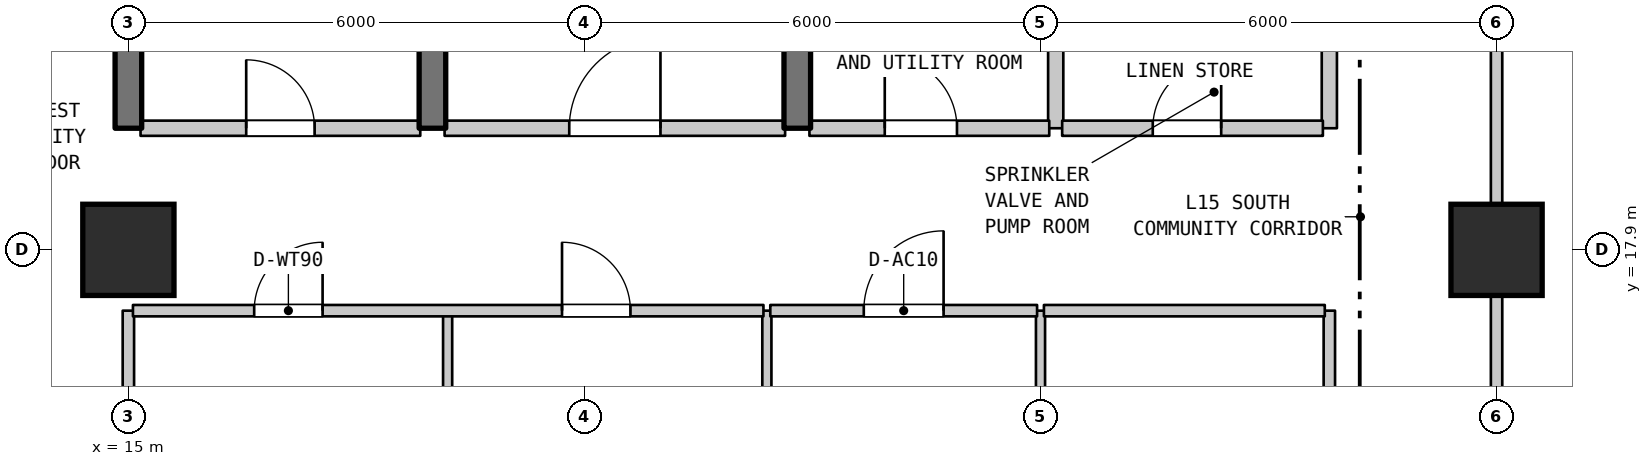
"""IFC4 building model, lengths in metres.
Left out: names, types, materials, properties, quantities, classifications, styles, units other than length and angle.
Written with IfcOpenShell. Run it as: python <this file> out.ifc"""

import sys

from ifc_helpers import new_model, si_unit, direction, frame, frame_2d, origin, origin_2d, place, context, subcontext, project, spatial, rectangle, extrude, element, fill, save


model = new_model("IFC4")
c1 = context("Model", 3, precision=1e-05, world=origin(), true_north=direction((0.0, 1.0)))
c2 = subcontext(c1, "Body", "Model", "MODEL_VIEW")
j1 = project(units=[si_unit("LENGTHUNIT", "METRE"), si_unit("PLANEANGLEUNIT", "RADIAN")], contexts=[c1])
p1 = place(None, origin())
s1 = spatial("IfcSite", under=j1, at=p1, CompositionType="ELEMENT")
p2 = place(p1, origin())
s2 = spatial("IfcBuilding", under=s1, at=p2, CompositionType="ELEMENT")
p3 = place(p2, frame((0.0, 0.0, 65.6)))
s3 = spatial("IfcBuildingStorey", under=s2, at=p3, CompositionType="ELEMENT", Elevation=65.6)
for number, where, z_axis, x_axis in (
    (1, (15.0, 17.9, 0.0), (0.0, 0.0, 1.0), (1.0, 0.0, 0.0)),
    (2, (33.0, 17.9, 0.0), (0.0, 0.0, 1.0), (1.0, 0.0, 0.0)),
):
    element("IfcColumn", number, at=place(p3, frame(where, z_axis=z_axis, x_axis=x_axis)), inside=s3, PredefinedType="COLUMN", context=c2, shape_type="SweptSolid", body=[
        extrude(rectangle(XDim=1.2, YDim=1.2, at=origin_2d()), origin(), (0.0, 0.0, 1.0), 4.5),
    ])
p4 = place(p3, frame((15.0, 13.0, 0.0), z_axis=(0.0, 0.0, 1.0), x_axis=(0.0, 1.0, 0.0)))
e3 = element("IfcWall", 3, at=p4, inside=s3, PredefinedType="STANDARD", context=c2, shape_type="SweptSolid", body=[
    extrude(rectangle(XDim=4.1, YDim=0.15, at=frame_2d((2.05, 0.0))), origin(), (0.0, 0.0, 1.0), 3.685),
])
for number, where, z_axis, x_axis in (
    (4, (15.0, 19.5, 0.0), (0.0, 0.0, 1.0), (0.0, 1.0, 0.0)),
    (5, (19.0, 19.5, 0.0), (0.0, 0.0, 1.0), (0.0, 1.0, 0.0)),
):
    element("IfcWall", number, at=place(p3, frame(where, z_axis=z_axis, x_axis=x_axis)), inside=s3, PredefinedType="SHEAR", context=c2, shape_type="SweptSolid", body=[
        extrude(rectangle(XDim=3.2, YDim=0.35, at=frame_2d((1.6, 0.0))), origin(), (0.0, 0.0, 1.0), 4.185),
    ])
for number, where, z_axis, x_axis in (
    (6, (19.2, 13.0, 0.0), (0.0, 0.0, 1.0), (0.0, 1.0, 0.0)),
    (7, (23.4, 13.0, 0.0), (0.0, 0.0, 1.0), (0.0, 1.0, 0.0)),
):
    element("IfcWall", number, at=place(p3, frame(where, z_axis=z_axis, x_axis=x_axis)), inside=s3, PredefinedType="PARTITIONING", context=c2, shape_type="SweptSolid", body=[
        extrude(rectangle(XDim=4.1, YDim=0.12, at=frame_2d((2.05, 0.0))), origin(), (0.0, 0.0, 1.0), 4.185),
    ])
p5 = place(p3, frame((23.8, 19.5, 0.0), z_axis=(0.0, 0.0, 1.0), x_axis=(0.0, 1.0, 0.0)))
e8 = element("IfcWall", 8, at=p5, inside=s3, PredefinedType="SHEAR", context=c2, shape_type="SweptSolid", body=[
    extrude(rectangle(XDim=3.2, YDim=0.35, at=frame_2d((1.6, 0.0))), origin(), (0.0, 0.0, 1.0), 4.185),
])
p6 = place(p3, frame((27.0, 14.5, 0.0), z_axis=(0.0, 0.0, 1.0), x_axis=(0.0, 1.0, 0.0)))
e9 = element("IfcWall", 9, at=p6, inside=s3, PredefinedType="PARTITIONING", context=c2, shape_type="SweptSolid", body=[
    extrude(rectangle(XDim=2.6, YDim=0.12, at=frame_2d((1.3, 0.0))), origin(), (0.0, 0.0, 1.0), 4.185),
])
p7 = place(p3, frame((27.2, 19.5, 0.0), z_axis=(0.0, 0.0, 1.0), x_axis=(0.0, 1.0, 0.0)))
e10 = element("IfcWall", 10, at=p7, inside=s3, PredefinedType="STANDARD", context=c2, shape_type="SweptSolid", body=[
    extrude(rectangle(XDim=1.6, YDim=0.2, at=frame_2d((0.8, 0.0))), origin(), (0.0, 0.0, 1.0), 4.185),
])
p8 = place(p3, frame((30.8, 14.5, 0.0), z_axis=(0.0, 0.0, 1.0), x_axis=(0.0, 1.0, 0.0)))
e11 = element("IfcWall", 11, at=p8, inside=s3, PredefinedType="STANDARD", context=c2, shape_type="SweptSolid", body=[
    extrude(rectangle(XDim=2.6, YDim=0.15, at=frame_2d((1.3, 0.0))), origin(), (0.0, 0.0, 1.0), 4.185),
])
p9 = place(p3, frame((30.8, 19.5, 0.0), z_axis=(0.0, 0.0, 1.0), x_axis=(0.0, 1.0, 0.0)))
e12 = element("IfcWall", 12, at=p9, inside=s3, PredefinedType="STANDARD", context=c2, shape_type="SweptSolid", body=[
    extrude(rectangle(XDim=1.6, YDim=0.2, at=frame_2d((0.8, 0.0))), origin(), (0.0, 0.0, 1.0), 4.185),
])
p10 = place(p3, frame((33.0, 6.7, 0.0), z_axis=(0.0, 0.0, 1.0), x_axis=(0.0, 1.0, 0.0)))
e13 = element("IfcWall", 13, at=p10, inside=s3, PredefinedType="STANDARD", context=c2, shape_type="SweptSolid", body=[
    extrude(rectangle(XDim=19.2, YDim=0.15, at=frame_2d((9.6, 0.0))), origin(), (0.0, 0.0, 1.0), 3.685),
])
p11 = place(p3, frame((15.06, 17.1, 0.0), z_axis=(0.0, 0.0, 1.0), x_axis=(1.0, 0.0, 0.0)))
e14 = element("IfcWall", 14, at=p11, inside=s3, PredefinedType="STANDARD", context=c2, shape_type="SweptSolid", body=[
    extrude(rectangle(XDim=8.295, YDim=0.15, at=frame_2d((4.147, 0.0))), origin(), (0.0, 0.0, 1.0), 4.185),
])
p12 = place(p11, frame((1.595, 0.0, 0.0)))
e15 = element("IfcOpeningElement", 15, at=p12, cuts=e14, PredefinedType="OPENING", context=c2, shape_type="SweptSolid", body=[
    extrude(rectangle(XDim=0.9, YDim=2.1, at=frame_2d((0.45, 1.05))), frame((0.0, 0.085, 0.0), z_axis=(0.0, -1.0, 0.0), x_axis=(1.0, 0.0, 0.0)), (0.0, 0.0, 1.0), 0.17),
])
p13 = place(p11, frame((5.645, 0.0, 0.0)))
e16 = element("IfcOpeningElement", 16, at=p13, cuts=e14, PredefinedType="OPENING", context=c2, shape_type="SweptSolid", body=[
    extrude(rectangle(XDim=0.9, YDim=2.1, at=frame_2d((0.45, 1.05))), frame((0.0, 0.085, 0.0), z_axis=(0.0, -1.0, 0.0), x_axis=(1.0, 0.0, 0.0)), (0.0, 0.0, 1.0), 0.17),
])
p14 = place(p3, frame((23.445, 17.1, 0.0), z_axis=(0.0, 0.0, 1.0), x_axis=(1.0, 0.0, 0.0)))
e17 = element("IfcWall", 17, at=p14, inside=s3, PredefinedType="STANDARD", context=c2, shape_type="SweptSolid", body=[
    extrude(rectangle(XDim=3.51, YDim=0.15, at=frame_2d((1.755, 0.0))), origin(), (0.0, 0.0, 1.0), 4.185),
])
p15 = place(p14, frame((1.23, 0.0, 0.0)))
e18 = element("IfcOpeningElement", 18, at=p15, cuts=e17, PredefinedType="OPENING", context=c2, shape_type="SweptSolid", body=[
    extrude(rectangle(XDim=1.05, YDim=2.15, at=frame_2d((0.525, 1.075))), frame((0.0, 0.085, 0.0), z_axis=(0.0, -1.0, 0.0), x_axis=(1.0, 0.0, 0.0)), (0.0, 0.0, 1.0), 0.17),
])
p16 = place(p3, frame((27.045, 17.1, 0.0), z_axis=(0.0, 0.0, 1.0), x_axis=(1.0, 0.0, 0.0)))
e19 = element("IfcWall", 19, at=p16, inside=s3, PredefinedType="STANDARD", context=c2, shape_type="SweptSolid", body=[
    extrude(rectangle(XDim=3.695, YDim=0.15, at=frame_2d((1.848, 0.0))), origin(), (0.0, 0.0, 1.0), 4.185),
])
p17 = place(p3, frame((15.16, 19.5, 0.0), z_axis=(0.0, 0.0, 1.0), x_axis=(1.0, 0.0, 0.0)))
e20 = element("IfcWall", 20, at=p17, inside=s3, PredefinedType="STANDARD", context=c2, shape_type="SweptSolid", body=[
    extrude(rectangle(XDim=3.68, YDim=0.2, at=frame_2d((1.84, 0.0))), origin(), (0.0, 0.0, 1.0), 4.185),
])
p18 = place(p17, frame((1.39, 0.0, 0.0)))
e21 = element("IfcOpeningElement", 21, at=p18, cuts=e20, PredefinedType="OPENING", context=c2, shape_type="SweptSolid", body=[
    extrude(rectangle(XDim=0.9, YDim=2.15, at=frame_2d((0.45, 1.075))), frame((0.0, 0.11, 0.0), z_axis=(0.0, -1.0, 0.0), x_axis=(1.0, 0.0, 0.0)), (0.0, 0.0, 1.0), 0.22),
])
p19 = place(p3, frame((19.16, 19.5, 0.0), z_axis=(0.0, 0.0, 1.0), x_axis=(1.0, 0.0, 0.0)))
e22 = element("IfcWall", 22, at=p19, inside=s3, PredefinedType="STANDARD", context=c2, shape_type="SweptSolid", body=[
    extrude(rectangle(XDim=4.48, YDim=0.2, at=frame_2d((2.24, 0.0))), origin(), (0.0, 0.0, 1.0), 4.185),
])
p20 = place(p19, frame((1.64, 0.0, 0.0)))
e23 = element("IfcOpeningElement", 23, at=p20, cuts=e22, PredefinedType="OPENING", context=c2, shape_type="SweptSolid", body=[
    extrude(rectangle(XDim=1.2, YDim=2.2, at=frame_2d((0.6, 1.1))), frame((0.0, 0.11, 0.0), z_axis=(0.0, -1.0, 0.0), x_axis=(1.0, 0.0, 0.0)), (0.0, 0.0, 1.0), 0.22),
])
p21 = place(p3, frame((23.96, 19.5, 0.0), z_axis=(0.0, 0.0, 1.0), x_axis=(1.0, 0.0, 0.0)))
e24 = element("IfcWall", 24, at=p21, inside=s3, PredefinedType="STANDARD", context=c2, shape_type="SweptSolid", body=[
    extrude(rectangle(XDim=3.155, YDim=0.2, at=frame_2d((1.578, 0.0))), origin(), (0.0, 0.0, 1.0), 4.185),
])
p22 = place(p21, frame((0.991, 0.0, 0.0)))
e25 = element("IfcOpeningElement", 25, at=p22, cuts=e24, PredefinedType="OPENING", context=c2, shape_type="SweptSolid", body=[
    extrude(rectangle(XDim=0.95, YDim=2.15, at=frame_2d((0.475, 1.075))), frame((0.0, 0.11, 0.0), z_axis=(0.0, -1.0, 0.0), x_axis=(1.0, 0.0, 0.0)), (0.0, 0.0, 1.0), 0.22),
])
p23 = place(p3, frame((27.285, 19.5, 0.0), z_axis=(0.0, 0.0, 1.0), x_axis=(1.0, 0.0, 0.0)))
e26 = element("IfcWall", 26, at=p23, inside=s3, PredefinedType="STANDARD", context=c2, shape_type="SweptSolid", body=[
    extrude(rectangle(XDim=3.43, YDim=0.2, at=frame_2d((1.715, 0.0))), origin(), (0.0, 0.0, 1.0), 4.185),
])
p24 = place(p23, frame((1.192, 0.0, 0.0)))
e27 = element("IfcOpeningElement", 27, at=p24, cuts=e26, PredefinedType="OPENING", context=c2, shape_type="SweptSolid", body=[
    extrude(rectangle(XDim=0.9, YDim=2.15, at=frame_2d((0.45, 1.075))), frame((0.0, 0.11, 0.0), z_axis=(0.0, -1.0, 0.0), x_axis=(1.0, 0.0, 0.0)), (0.0, 0.0, 1.0), 0.22),
])
p25 = place(p12, origin())
e28 = element("IfcDoor", 28, at=p25, inside=s3, OperationType="SINGLE_SWING_RIGHT", PredefinedType="DOOR", context=c2, shape_type="SweptSolid", body=[
    extrude(rectangle(XDim=0.9, YDim=2.1, at=frame_2d((0.45, 1.05))), frame((0.0, 0.025, 0.0), z_axis=(0.0, -1.0, 0.0), x_axis=(1.0, 0.0, 0.0)), (0.0, 0.0, 1.0), 0.05),
])
fill(e15, e28)
p26 = place(p13, origin())
e29 = element("IfcDoor", 29, at=p26, inside=s3, OperationType="SINGLE_SWING_LEFT", PredefinedType="DOOR", context=c2, shape_type="SweptSolid", body=[
    extrude(rectangle(XDim=0.9, YDim=2.1, at=frame_2d((0.45, 1.05))), frame((0.0, 0.025, 0.0), z_axis=(0.0, -1.0, 0.0), x_axis=(1.0, 0.0, 0.0)), (0.0, 0.0, 1.0), 0.05),
])
fill(e16, e29)
p27 = place(p15, origin())
e30 = element("IfcDoor", 30, at=p27, inside=s3, OperationType="SINGLE_SWING_RIGHT", PredefinedType="DOOR", context=c2, shape_type="SweptSolid", body=[
    extrude(rectangle(XDim=1.05, YDim=2.15, at=frame_2d((0.525, 1.075))), frame((0.0, 0.025, 0.0), z_axis=(0.0, -1.0, 0.0), x_axis=(1.0, 0.0, 0.0)), (0.0, 0.0, 1.0), 0.05),
])
fill(e18, e30)
p28 = place(p18, origin())
e31 = element("IfcDoor", 31, at=p28, inside=s3, OperationType="SINGLE_SWING_LEFT", PredefinedType="DOOR", context=c2, shape_type="SweptSolid", body=[
    extrude(rectangle(XDim=0.9, YDim=2.15, at=frame_2d((0.45, 1.075))), frame((0.0, 0.025, 0.0), z_axis=(0.0, -1.0, 0.0), x_axis=(1.0, 0.0, 0.0)), (0.0, 0.0, 1.0), 0.05),
])
fill(e21, e31)
p29 = place(p20, origin())
e32 = element("IfcDoor", 32, at=p29, inside=s3, OperationType="SINGLE_SWING_RIGHT", PredefinedType="DOOR", context=c2, shape_type="SweptSolid", body=[
    extrude(rectangle(XDim=1.2, YDim=2.2, at=frame_2d((0.6, 1.1))), frame((0.0, 0.025, 0.0), z_axis=(0.0, -1.0, 0.0), x_axis=(1.0, 0.0, 0.0)), (0.0, 0.0, 1.0), 0.05),
])
fill(e23, e32)
p30 = place(p22, origin())
e33 = element("IfcDoor", 33, at=p30, inside=s3, OperationType="SINGLE_SWING_LEFT", PredefinedType="DOOR", context=c2, shape_type="SweptSolid", body=[
    extrude(rectangle(XDim=0.95, YDim=2.15, at=frame_2d((0.475, 1.075))), frame((0.0, 0.025, 0.0), z_axis=(0.0, -1.0, 0.0), x_axis=(1.0, 0.0, 0.0)), (0.0, 0.0, 1.0), 0.05),
])
fill(e25, e33)
p31 = place(p24, origin())
e34 = element("IfcDoor", 34, at=p31, inside=s3, OperationType="SINGLE_SWING_RIGHT", PredefinedType="DOOR", context=c2, shape_type="SweptSolid", body=[
    extrude(rectangle(XDim=0.9, YDim=2.15, at=frame_2d((0.45, 1.075))), frame((0.0, 0.025, 0.0), z_axis=(0.0, -1.0, 0.0), x_axis=(1.0, 0.0, 0.0)), (0.0, 0.0, 1.0), 0.05),
])
fill(e27, e34)
save(model, sys.argv[1])
